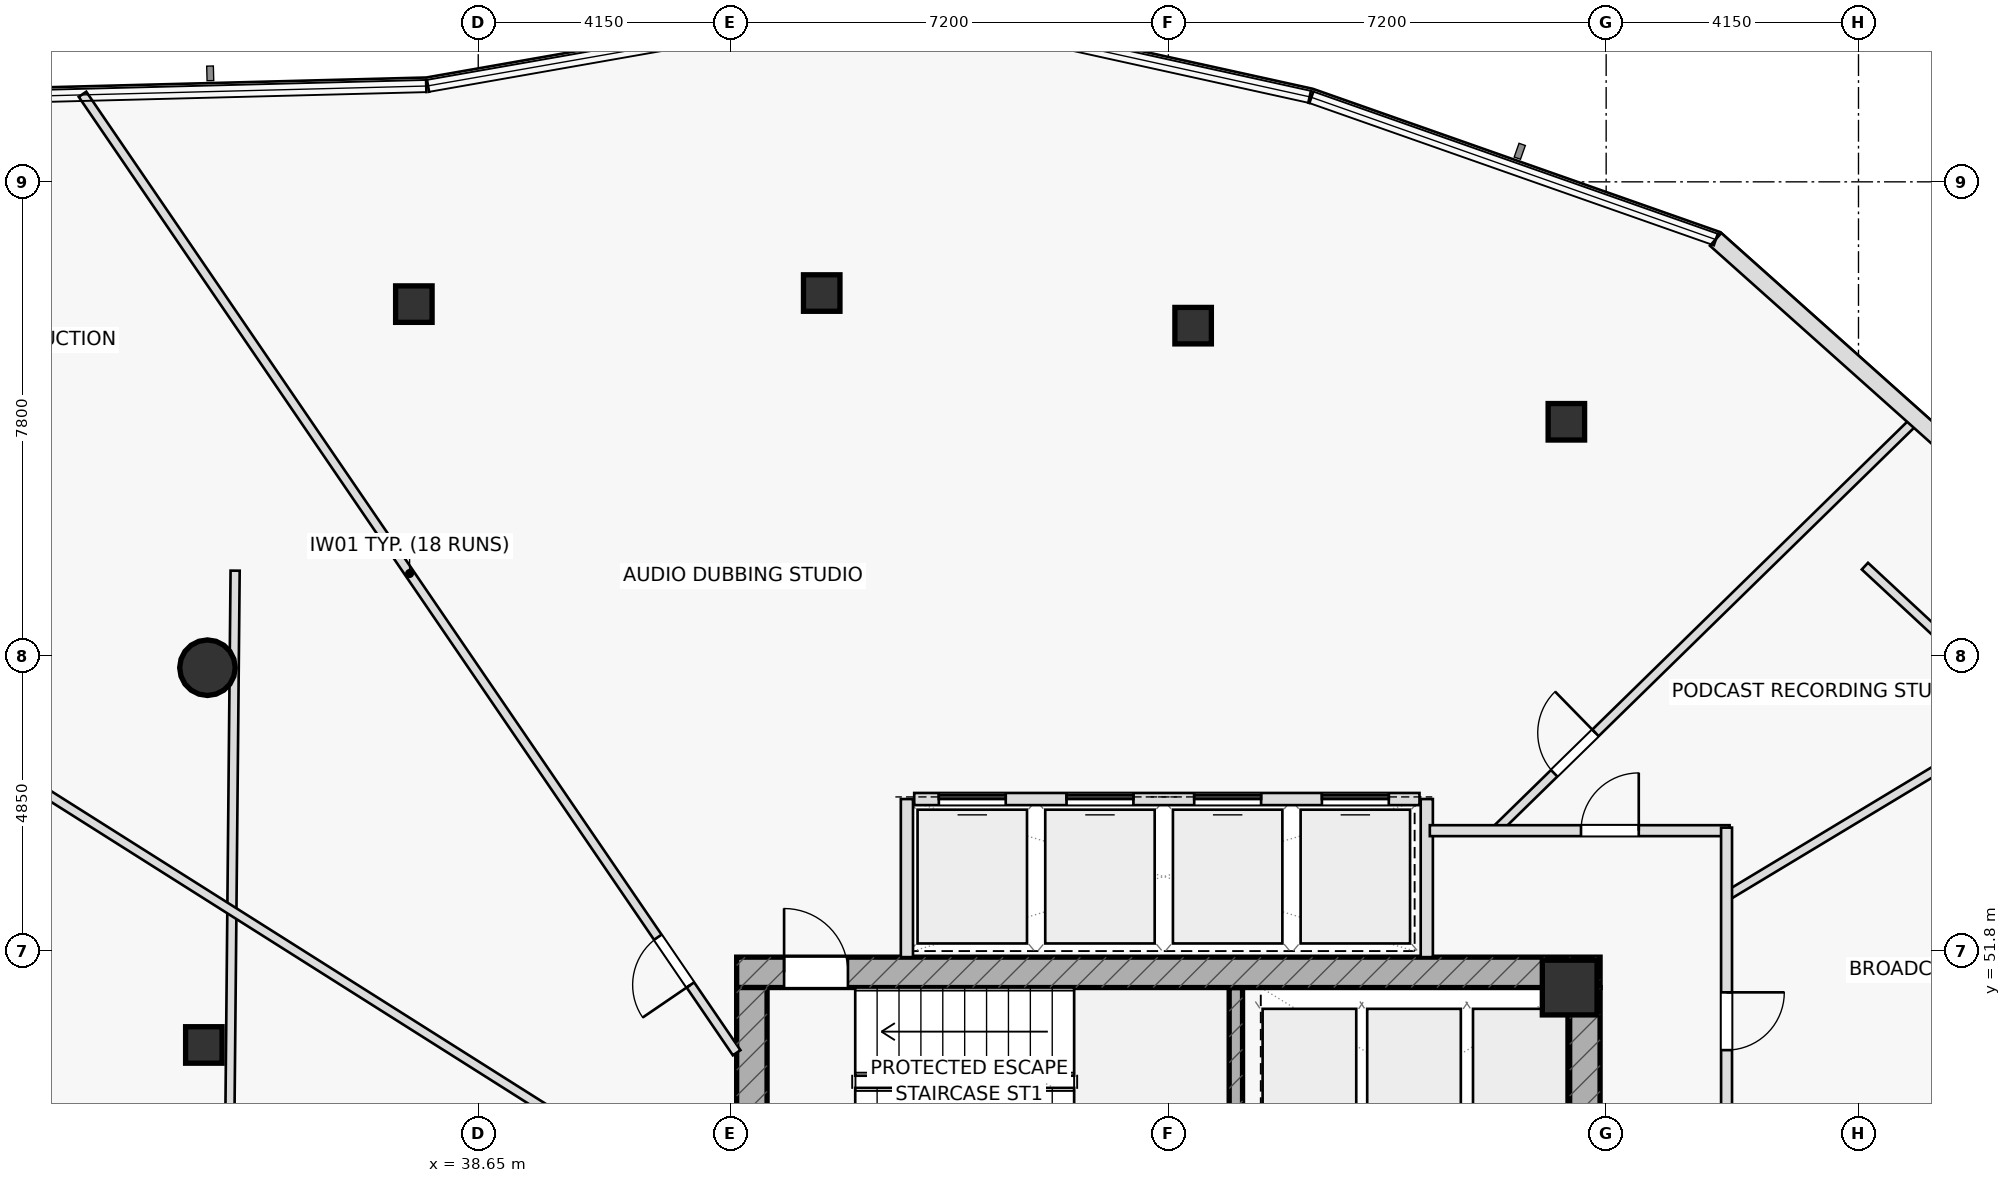
"""IFC4 building model, lengths in metres.
Left out: names, types, materials, properties, quantities, classifications, styles, units other than length and angle.
Written with IfcOpenShell. Run it as: python <this file> out.ifc"""

import sys

from ifc_helpers import new_model, si_unit, direction, frame, frame_2d, origin, origin_2d, place, context, subcontext, project, spatial, rectangle, hollow_rectangle, hollow_circle, extrude, element, fill, save


model = new_model("IFC4")
c1 = context("Model", 3, precision=1e-05, world=origin(), true_north=direction((0.0, 1.0)))
c2 = subcontext(c1, "Body", "Model", "MODEL_VIEW")
j1 = project(units=[si_unit("LENGTHUNIT", "METRE"), si_unit("PLANEANGLEUNIT", "RADIAN")], contexts=[c1])
p1 = place(None, origin())
s1 = spatial("IfcSite", under=j1, at=p1, CompositionType="ELEMENT")
p2 = place(p1, origin())
s2 = spatial("IfcBuilding", under=s1, at=p2, CompositionType="ELEMENT")
p3 = place(p2, frame((0.0, 0.0, 226.1)))
s3 = spatial("IfcBuildingStorey", under=s2, at=p3, CompositionType="ELEMENT", Elevation=226.1)
p4 = place(p3, frame((51.11, 48.1, 0.0), z_axis=(0.0, 0.0, 1.0), x_axis=(0.0, 1.0, 0.0)))
e1 = element("IfcWall", 1, at=p4, inside=s3, PredefinedType="SHEAR", context=c2, shape_type="SweptSolid", body=[
    extrude(rectangle(XDim=3.1, YDim=0.22, at=frame_2d((1.55, 0.0))), origin(), (0.0, 0.0, 1.0), 3.65),
])
p5 = place(p3, frame((42.9, 51.45, 0.0), z_axis=(0.0, 0.0, 1.0), x_axis=(1.0, 0.0, 0.0)))
e2 = element("IfcWall", 2, at=p5, inside=s3, PredefinedType="SHEAR", context=c2, shape_type="SweptSolid", body=[
    extrude(rectangle(XDim=14.2, YDim=0.5, at=frame_2d((7.1, 0.0))), origin(), (0.0, 0.0, 1.0), 3.65),
])
p6 = place(p5, frame((0.78, 0.0, 0.0)))
e3 = element("IfcOpeningElement", 3, at=p6, cuts=e2, PredefinedType="OPENING", context=c2, shape_type="SweptSolid", body=[
    extrude(rectangle(XDim=1.05, YDim=2.2, at=frame_2d((0.525, 1.1))), frame((0.0, 0.26, 0.0), z_axis=(0.0, -1.0, 0.0), x_axis=(1.0, 0.0, 0.0)), (0.0, 0.0, 1.0), 0.52),
])
p7 = place(p3, frame((43.15, 38.8, 0.0), z_axis=(0.0, 0.0, 1.0), x_axis=(0.0, 1.0, 0.0)))
e4 = element("IfcWall", 4, at=p7, inside=s3, PredefinedType="SHEAR", context=c2, shape_type="SweptSolid", body=[
    extrude(rectangle(XDim=12.4, YDim=0.5, at=frame_2d((6.2, 0.0))), origin(), (0.0, 0.0, 1.0), 3.65),
])
p8 = place(p3, frame((56.85, 38.8, 0.0), z_axis=(0.0, 0.0, 1.0), x_axis=(0.0, 1.0, 0.0)))
e5 = element("IfcWall", 5, at=p8, inside=s3, PredefinedType="SHEAR", context=c2, shape_type="SweptSolid", body=[
    extrude(rectangle(XDim=12.4, YDim=0.5, at=frame_2d((6.2, 0.0))), origin(), (0.0, 0.0, 1.0), 3.65),
])
p9 = place(p8, frame((3.85, 0.0, 0.0)))
e6 = element("IfcOpeningElement", 6, at=p9, cuts=e5, PredefinedType="OPENING", context=c2, shape_type="SweptSolid", body=[
    extrude(rectangle(XDim=1.5, YDim=2.2, at=frame_2d((0.75, 1.1))), frame((0.0, 0.26, 0.0), z_axis=(0.0, -1.0, 0.0), x_axis=(1.0, 0.0, 0.0)), (0.0, 0.0, 1.0), 0.52),
])
p10 = place(p3, frame((56.6, 51.2, 0.0), z_axis=(0.0, 0.0, 1.0), x_axis=(1.0, 0.0, 0.0)))
e7 = element("IfcColumn", 7, at=p10, inside=s3, PredefinedType="COLUMN", context=c2, shape_type="SweptSolid", body=[
    extrude(rectangle(XDim=0.9, YDim=0.9, at=origin_2d()), origin(), (0.0, 0.0, 1.0), 3.65),
])
p11 = place(p3, frame((34.196, 56.46, 0.0), z_axis=(0.0, 0.0, 1.0), x_axis=(1.0, 0.0, 0.0)))
e8 = element("IfcColumn", 8, at=p11, inside=s3, PredefinedType="COLUMN", context=c2, shape_type="SweptSolid", body=[
    extrude(hollow_circle(Radius=0.457, WallThickness=0.04, at=origin_2d()), origin(), (0.0, 0.0, 1.0), 3.65),
])
for number, where, z_axis, x_axis in (
    (9, (34.137, 50.256, 0.0), (0.0, 0.0, 1.0), (1.0, 0.0, 0.0)),
    (10, (56.546, 60.504, 0.0), (0.0, 0.0, 1.0), (1.0, 0.0, 0.0)),
    (11, (50.407, 62.085, 0.0), (0.0, 0.0, 1.0), (1.0, 0.0, 0.0)),
    (12, (44.299, 62.621, 0.0), (0.0, 0.0, 1.0), (1.0, 0.0, 0.0)),
    (13, (37.591, 62.439, 0.0), (0.0, 0.0, 1.0), (1.0, 0.0, 0.0)),
):
    element("IfcColumn", number, at=place(p3, frame(where, z_axis=z_axis, x_axis=x_axis)), inside=s3, PredefinedType="COLUMN", context=c2, shape_type="SweptSolid", body=[
        extrude(hollow_rectangle(XDim=0.6, YDim=0.6, WallThickness=0.036, at=origin_2d()), origin(), (0.0, 0.0, 1.0), 3.65),
    ])
for number, where, z_axis, x_axis in (
    (14, (45.7, 51.7, 0.0), (0.0, 0.0, 1.0), (0.0, 1.0, 0.0)),
    (15, (54.25, 51.7, 0.0), (0.0, 0.0, 1.0), (0.0, 1.0, 0.0)),
):
    element("IfcWall", number, at=place(p3, frame(where, z_axis=z_axis, x_axis=x_axis)), inside=s3, PredefinedType="PARTITIONING", context=c2, shape_type="SweptSolid", body=[
        extrude(rectangle(XDim=2.6, YDim=0.2, at=frame_2d((1.3, 0.0))), origin(), (0.0, 0.0, 1.0), 3.65),
    ])
p12 = place(p3, frame((34.652, 58.056, 0.0), z_axis=(0.0, 0.0, 1.0), x_axis=(-0.009553538759, -0.999954363907, 0.0)))
e16 = element("IfcWall", 16, at=p12, inside=s3, PredefinedType="PARTITIONING", context=c2, shape_type="SweptSolid", body=[
    extrude(rectangle(XDim=9.404, YDim=0.15, at=frame_2d((4.702, 0.0))), origin(), (0.0, 0.0, 1.0), 3.135),
])
p13 = place(p3, frame((69.792, 50.388, 0.0), z_axis=(0.0, 0.0, 1.0), x_axis=(-0.732769799181, 0.680476613418, 0.0)))
e17 = element("IfcWall", 17, at=p13, inside=s3, PredefinedType="PARTITIONING", context=c2, shape_type="SweptSolid", body=[
    extrude(rectangle(XDim=11.378, YDim=0.15, at=frame_2d((5.689, 0.0))), origin(), (0.0, 0.0, 1.0), 3.025),
])
p14 = place(p3, frame((59.18, 52.703, 0.0), z_axis=(0.0, 0.0, 1.0), x_axis=(0.856467782729, 0.516200481544, 0.0)))
e18 = element("IfcWall", 18, at=p14, inside=s3, PredefinedType="PARTITIONING", context=c2, shape_type="SweptSolid", body=[
    extrude(rectangle(XDim=8.651, YDim=0.15, at=frame_2d((4.325, 0.0))), origin(), (0.0, 0.0, 1.0), 3.135),
])
p15 = place(p3, frame((55.38, 53.78, 0.0), z_axis=(0.0, 0.0, 1.0), x_axis=(0.715018135808, 0.699105904327, 0.0)))
e19 = element("IfcWall", 19, at=p15, inside=s3, PredefinedType="PARTITIONING", context=c2, shape_type="SweptSolid", body=[
    extrude(rectangle(XDim=9.697, YDim=0.15, at=frame_2d((4.848, 0.0))), origin(), (0.0, 0.0, 1.0), 3.025),
])
p16 = place(p15, frame((1.35, 0.0, 0.0)))
e20 = element("IfcOpeningElement", 20, at=p16, cuts=e19, PredefinedType="OPENING", context=c2, shape_type="SweptSolid", body=[
    extrude(rectangle(XDim=0.95, YDim=2.05, at=frame_2d((0.475, 1.025))), frame((0.0, 0.085, 0.0), z_axis=(0.0, -1.0, 0.0), x_axis=(1.0, 0.0, 0.0)), (0.0, 0.0, 1.0), 0.17),
])
p17 = place(p3, frame((42.9, 50.128, 0.0), z_axis=(0.0, 0.0, 1.0), x_axis=(-0.563748413046, 0.825946564124, 0.0)))
e21 = element("IfcWall", 21, at=p17, inside=s3, PredefinedType="PARTITIONING", context=c2, shape_type="SweptSolid", body=[
    extrude(rectangle(XDim=19.083, YDim=0.15, at=frame_2d((9.542, 0.0))), origin(), (0.0, 0.0, 1.0), 3.025),
])
p18 = place(p17, frame((1.35, 0.0, 0.0)))
e22 = element("IfcOpeningElement", 22, at=p18, cuts=e21, PredefinedType="OPENING", context=c2, shape_type="SweptSolid", body=[
    extrude(rectangle(XDim=0.95, YDim=2.05, at=frame_2d((0.475, 1.025))), frame((0.0, 0.085, 0.0), z_axis=(0.0, -1.0, 0.0), x_axis=(1.0, 0.0, 0.0)), (0.0, 0.0, 1.0), 0.17),
])
p19 = place(p3, frame((41.75, 47.94, 0.0), z_axis=(0.0, 0.0, 1.0), x_axis=(-0.845215418547, 0.534425763086, 0.0)))
e23 = element("IfcWall", 23, at=p19, inside=s3, PredefinedType="PARTITIONING", context=c2, shape_type="SweptSolid", body=[
    extrude(rectangle(XDim=18.802, YDim=0.15, at=frame_2d((9.401, 0.0))), origin(), (0.0, 0.0, 1.0), 3.025),
])
p20 = place(p19, frame((1.35, 0.0, 0.0)))
e24 = element("IfcOpeningElement", 24, at=p20, cuts=e23, PredefinedType="OPENING", context=c2, shape_type="SweptSolid", body=[
    extrude(rectangle(XDim=0.95, YDim=2.05, at=frame_2d((0.475, 1.025))), frame((0.0, 0.085, 0.0), z_axis=(0.0, -1.0, 0.0), x_axis=(1.0, 0.0, 0.0)), (0.0, 0.0, 1.0), 0.17),
])
p21 = place(p3, frame((54.3, 53.78, 0.0), z_axis=(0.0, 0.0, 1.0), x_axis=(1.0, 0.0, 0.0)))
e25 = element("IfcWall", 25, at=p21, inside=s3, PredefinedType="PARTITIONING", context=c2, shape_type="SweptSolid", body=[
    extrude(rectangle(XDim=4.93, YDim=0.18, at=frame_2d((2.465, 0.0))), origin(), (0.0, 0.0, 1.0), 3.65),
])
p22 = place(p21, frame((2.486, 0.0, 0.0)))
e26 = element("IfcOpeningElement", 26, at=p22, cuts=e25, PredefinedType="OPENING", context=c2, shape_type="SweptSolid", body=[
    extrude(rectangle(XDim=0.95, YDim=2.05, at=frame_2d((0.475, 1.025))), frame((0.0, 0.1, 0.0), z_axis=(0.0, -1.0, 0.0), x_axis=(1.0, 0.0, 0.0)), (0.0, 0.0, 1.0), 0.2),
])
p23 = place(p3, frame((59.18, 53.83, 0.0), z_axis=(0.0, 0.0, 1.0), x_axis=(0.0, -1.0, 0.0)))
e27 = element("IfcWall", 27, at=p23, inside=s3, PredefinedType="PARTITIONING", context=c2, shape_type="SweptSolid", body=[
    extrude(rectangle(XDim=5.53, YDim=0.18, at=frame_2d((2.765, 0.0))), origin(), (0.0, 0.0, 1.0), 3.65),
])
p24 = place(p23, frame((2.709, 0.0, 0.0)))
e28 = element("IfcOpeningElement", 28, at=p24, cuts=e27, PredefinedType="OPENING", context=c2, shape_type="SweptSolid", body=[
    extrude(rectangle(XDim=0.95, YDim=2.05, at=frame_2d((0.475, 1.025))), frame((0.0, 0.1, 0.0), z_axis=(0.0, -1.0, 0.0), x_axis=(1.0, 0.0, 0.0)), (0.0, 0.0, 1.0), 0.2),
])
p25 = place(p3, frame((64.792, 58.333, 0.0), z_axis=(0.0, 0.0, 1.0), x_axis=(-0.745976161207, 0.665972647269, 0.0)))
e29 = element("IfcWall", 29, at=p25, inside=s3, PredefinedType="STANDARD", context=c2, shape_type="SweptSolid", body=[
    extrude(rectangle(XDim=7.763, YDim=0.28, at=frame_2d((3.882, 0.0))), origin(), (0.0, 0.0, 1.0), 3.65),
])
p26 = place(p3, frame((45.82, 54.3, 0.0), z_axis=(0.0, 0.0, 1.0), x_axis=(1.0, 0.0, 0.0)))
e30 = element("IfcWall", 30, at=p26, inside=s3, PredefinedType="PARTITIONING", context=c2, shape_type="SweptSolid", body=[
    extrude(rectangle(XDim=8.31, YDim=0.2, at=frame_2d((4.155, 0.0))), origin(), (0.0, 0.0, 1.0), 3.65),
])
p27 = place(p26, frame((0.405, 0.0, 0.0)))
e31 = element("IfcOpeningElement", 31, at=p27, cuts=e30, PredefinedType="OPENING", context=c2, shape_type="SweptSolid", body=[
    extrude(rectangle(XDim=1.1, YDim=2.15, at=frame_2d((0.55, 1.075))), frame((0.0, 0.11, 0.0), z_axis=(0.0, -1.0, 0.0), x_axis=(1.0, 0.0, 0.0)), (0.0, 0.0, 1.0), 0.22),
])
p28 = place(p26, frame((2.505, 0.0, 0.0)))
e32 = element("IfcOpeningElement", 32, at=p28, cuts=e30, PredefinedType="OPENING", context=c2, shape_type="SweptSolid", body=[
    extrude(rectangle(XDim=1.1, YDim=2.15, at=frame_2d((0.55, 1.075))), frame((0.0, 0.11, 0.0), z_axis=(0.0, -1.0, 0.0), x_axis=(1.0, 0.0, 0.0)), (0.0, 0.0, 1.0), 0.22),
])
p29 = place(p26, frame((4.605, 0.0, 0.0)))
e33 = element("IfcOpeningElement", 33, at=p29, cuts=e30, PredefinedType="OPENING", context=c2, shape_type="SweptSolid", body=[
    extrude(rectangle(XDim=1.1, YDim=2.15, at=frame_2d((0.55, 1.075))), frame((0.0, 0.11, 0.0), z_axis=(0.0, -1.0, 0.0), x_axis=(1.0, 0.0, 0.0)), (0.0, 0.0, 1.0), 0.22),
])
p30 = place(p26, frame((6.705, 0.0, 0.0)))
e34 = element("IfcOpeningElement", 34, at=p30, cuts=e30, PredefinedType="OPENING", context=c2, shape_type="SweptSolid", body=[
    extrude(rectangle(XDim=1.1, YDim=2.15, at=frame_2d((0.55, 1.075))), frame((0.0, 0.11, 0.0), z_axis=(0.0, -1.0, 0.0), x_axis=(1.0, 0.0, 0.0)), (0.0, 0.0, 1.0), 0.22),
])
p31 = place(p6, origin())
e35 = element("IfcDoor", 35, at=p31, inside=s3, OperationType="SINGLE_SWING_LEFT", PredefinedType="DOOR", context=c2, shape_type="SweptSolid", body=[
    extrude(rectangle(XDim=1.05, YDim=2.2, at=frame_2d((0.525, 1.1))), frame((0.0, 0.025, 0.0), z_axis=(0.0, -1.0, 0.0), x_axis=(1.0, 0.0, 0.0)), (0.0, 0.0, 1.0), 0.05),
])
fill(e3, e35)
p32 = place(p16, origin())
e36 = element("IfcDoor", 36, at=p32, inside=s3, OperationType="SINGLE_SWING_RIGHT", PredefinedType="DOOR", context=c2, shape_type="SweptSolid", body=[
    extrude(rectangle(XDim=0.95, YDim=2.05, at=frame_2d((0.475, 1.025))), frame((0.0, 0.025, 0.0), z_axis=(0.0, -1.0, 0.0), x_axis=(1.0, 0.0, 0.0)), (0.0, 0.0, 1.0), 0.05),
])
fill(e20, e36)
p33 = place(p18, origin())
e37 = element("IfcDoor", 37, at=p33, inside=s3, OperationType="SINGLE_SWING_LEFT", PredefinedType="DOOR", context=c2, shape_type="SweptSolid", body=[
    extrude(rectangle(XDim=0.95, YDim=2.05, at=frame_2d((0.475, 1.025))), frame((0.0, 0.025, 0.0), z_axis=(0.0, -1.0, 0.0), x_axis=(1.0, 0.0, 0.0)), (0.0, 0.0, 1.0), 0.05),
])
fill(e22, e37)
p34 = place(p22, origin())
e38 = element("IfcDoor", 38, at=p34, inside=s3, OperationType="SINGLE_SWING_RIGHT", PredefinedType="DOOR", context=c2, shape_type="SweptSolid", body=[
    extrude(rectangle(XDim=0.95, YDim=2.05, at=frame_2d((0.475, 1.025))), frame((0.0, 0.025, 0.0), z_axis=(0.0, -1.0, 0.0), x_axis=(1.0, 0.0, 0.0)), (0.0, 0.0, 1.0), 0.05),
])
fill(e26, e38)
p35 = place(p24, origin())
e39 = element("IfcDoor", 39, at=p35, inside=s3, OperationType="SINGLE_SWING_LEFT", PredefinedType="DOOR", context=c2, shape_type="SweptSolid", body=[
    extrude(rectangle(XDim=0.95, YDim=2.05, at=frame_2d((0.475, 1.025))), frame((0.0, 0.025, 0.0), z_axis=(0.0, -1.0, 0.0), x_axis=(1.0, 0.0, 0.0)), (0.0, 0.0, 1.0), 0.05),
])
fill(e28, e39)
p36 = place(p27, origin())
e40 = element("IfcDoor", 40, at=p36, inside=s3, OperationType="SLIDING_TO_LEFT", PredefinedType="DOOR", context=c2, shape_type="SweptSolid", body=[
    extrude(rectangle(XDim=1.1, YDim=2.15, at=frame_2d((0.55, 1.075))), frame((0.0, 0.025, 0.0), z_axis=(0.0, -1.0, 0.0), x_axis=(1.0, 0.0, 0.0)), (0.0, 0.0, 1.0), 0.05),
])
fill(e31, e40)
p37 = place(p28, origin())
e41 = element("IfcDoor", 41, at=p37, inside=s3, OperationType="SLIDING_TO_RIGHT", PredefinedType="DOOR", context=c2, shape_type="SweptSolid", body=[
    extrude(rectangle(XDim=1.1, YDim=2.15, at=frame_2d((0.55, 1.075))), frame((0.0, 0.025, 0.0), z_axis=(0.0, -1.0, 0.0), x_axis=(1.0, 0.0, 0.0)), (0.0, 0.0, 1.0), 0.05),
])
fill(e32, e41)
p38 = place(p29, origin())
e42 = element("IfcDoor", 42, at=p38, inside=s3, OperationType="SLIDING_TO_LEFT", PredefinedType="DOOR", context=c2, shape_type="SweptSolid", body=[
    extrude(rectangle(XDim=1.1, YDim=2.15, at=frame_2d((0.55, 1.075))), frame((0.0, 0.025, 0.0), z_axis=(0.0, -1.0, 0.0), x_axis=(1.0, 0.0, 0.0)), (0.0, 0.0, 1.0), 0.05),
])
fill(e33, e42)
p39 = place(p30, origin())
e43 = element("IfcDoor", 43, at=p39, inside=s3, OperationType="SLIDING_TO_RIGHT", PredefinedType="DOOR", context=c2, shape_type="SweptSolid", body=[
    extrude(rectangle(XDim=1.1, YDim=2.15, at=frame_2d((0.55, 1.075))), frame((0.0, 0.025, 0.0), z_axis=(0.0, -1.0, 0.0), x_axis=(1.0, 0.0, 0.0)), (0.0, 0.0, 1.0), 0.05),
])
fill(e34, e43)
save(model, sys.argv[1])
